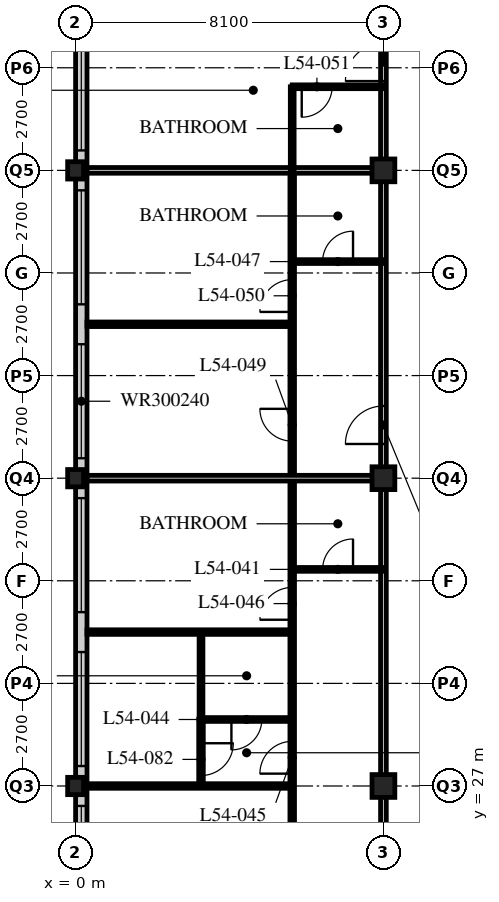
"""IFC4 building model, lengths in metres.
Left out: names, types, materials, properties, quantities, classifications, styles, units other than length and angle.
Written with IfcOpenShell. Run it as: python <this file> out.ifc"""

import sys

from ifc_helpers import new_model, si_unit, direction, frame, frame_2d, origin, origin_2d, place, context, subcontext, project, spatial, rectangle, hollow_rectangle, i_section, extrude, element, fill, save


model = new_model("IFC4")
c1 = context("Model", 3, precision=1e-05, world=origin(), true_north=direction((0.0, 1.0)))
c2 = subcontext(c1, "Body", "Model", "MODEL_VIEW")
j1 = project(units=[si_unit("LENGTHUNIT", "METRE"), si_unit("PLANEANGLEUNIT", "RADIAN")], contexts=[c1])
p1 = place(None, origin())
s1 = spatial("IfcSite", under=j1, at=p1, CompositionType="ELEMENT")
p2 = place(p1, origin())
s2 = spatial("IfcBuilding", under=s1, at=p2, CompositionType="ELEMENT")
p3 = place(p2, frame((0.0, 0.0, 210.0)))
s3 = spatial("IfcBuildingStorey", under=s2, at=p3, CompositionType="ELEMENT", Elevation=210.0)
for number, where, z_axis, x_axis in (
    (1, (0.0, 27.0, 0.0), (0.0, 0.0, 1.0), (1.0, 0.0, 0.0)),
    (2, (0.0, 35.1, 0.0), (0.0, 0.0, 1.0), (1.0, 0.0, 0.0)),
    (3, (0.0, 43.2, 0.0), (0.0, 0.0, 1.0), (1.0, 0.0, 0.0)),
):
    element("IfcColumn", number, at=place(p3, frame(where, z_axis=z_axis, x_axis=x_axis)), inside=s3, PredefinedType="COLUMN", context=c2, shape_type="SweptSolid", body=[
        extrude(i_section(OverallWidth=0.418, OverallDepth=0.456, WebThickness=0.042, FlangeThickness=0.067, FilletRadius=0.015, at=origin_2d()), origin(), (0.0, 0.0, 1.0), 3.6),
    ])
for number, where, z_axis, x_axis in (
    (4, (8.1, 27.0, 0.0), (0.0, 0.0, 1.0), (1.0, 0.0, 0.0)),
    (5, (8.1, 35.1, 0.0), (0.0, 0.0, 1.0), (1.0, 0.0, 0.0)),
    (6, (8.1, 43.2, 0.0), (0.0, 0.0, 1.0), (1.0, 0.0, 0.0)),
):
    element("IfcColumn", number, at=place(p3, frame(where, z_axis=z_axis, x_axis=x_axis)), inside=s3, PredefinedType="COLUMN", context=c2, shape_type="SweptSolid", body=[
        extrude(hollow_rectangle(XDim=0.6, YDim=0.6, WallThickness=0.05, at=origin_2d()), origin(), (0.0, 0.0, 1.0), 3.6),
    ])
p4 = place(p3, frame((0.15, 51.0, 0.0), z_axis=(0.0, 0.0, 1.0), x_axis=(0.0, -1.0, 0.0)))
e7 = element("IfcWall", 7, at=p4, inside=s3, PredefinedType="SOLIDWALL", context=c2, shape_type="SweptSolid", body=[
    extrude(rectangle(XDim=32.1, YDim=0.3, at=frame_2d((16.05, 0.0))), origin(), (0.0, 0.0, 1.0), 3.39),
])
p5 = place(p4, frame((0.225, 0.0, 0.6)))
e8 = element("IfcOpeningElement", 8, at=p5, cuts=e7, PredefinedType="OPENING", context=c2, shape_type="SweptSolid", body=[
    extrude(rectangle(XDim=3.0, YDim=2.4, at=frame_2d((1.5, 1.2))), frame((0.0, 0.16, 0.0), z_axis=(0.0, -1.0, 0.0), x_axis=(1.0, 0.0, 0.0)), (0.0, 0.0, 1.0), 0.32),
])
p6 = place(p4, frame((4.275, 0.0, 0.6)))
e9 = element("IfcOpeningElement", 9, at=p6, cuts=e7, PredefinedType="OPENING", context=c2, shape_type="SweptSolid", body=[
    extrude(rectangle(XDim=3.0, YDim=2.4, at=frame_2d((1.5, 1.2))), frame((0.0, 0.16, 0.0), z_axis=(0.0, -1.0, 0.0), x_axis=(1.0, 0.0, 0.0)), (0.0, 0.0, 1.0), 0.32),
])
p7 = place(p4, frame((8.325, 0.0, 0.6)))
e10 = element("IfcOpeningElement", 10, at=p7, cuts=e7, PredefinedType="OPENING", context=c2, shape_type="SweptSolid", body=[
    extrude(rectangle(XDim=3.0, YDim=2.4, at=frame_2d((1.5, 1.2))), frame((0.0, 0.16, 0.0), z_axis=(0.0, -1.0, 0.0), x_axis=(1.0, 0.0, 0.0)), (0.0, 0.0, 1.0), 0.32),
])
p8 = place(p4, frame((12.375, 0.0, 0.6)))
e11 = element("IfcOpeningElement", 11, at=p8, cuts=e7, PredefinedType="OPENING", context=c2, shape_type="SweptSolid", body=[
    extrude(rectangle(XDim=3.0, YDim=2.4, at=frame_2d((1.5, 1.2))), frame((0.0, 0.16, 0.0), z_axis=(0.0, -1.0, 0.0), x_axis=(1.0, 0.0, 0.0)), (0.0, 0.0, 1.0), 0.32),
])
p9 = place(p4, frame((16.425, 0.0, 0.6)))
e12 = element("IfcOpeningElement", 12, at=p9, cuts=e7, PredefinedType="OPENING", context=c2, shape_type="SweptSolid", body=[
    extrude(rectangle(XDim=3.0, YDim=2.4, at=frame_2d((1.5, 1.2))), frame((0.0, 0.16, 0.0), z_axis=(0.0, -1.0, 0.0), x_axis=(1.0, 0.0, 0.0)), (0.0, 0.0, 1.0), 0.32),
])
p10 = place(p4, frame((20.475, 0.0, 0.6)))
e13 = element("IfcOpeningElement", 13, at=p10, cuts=e7, PredefinedType="OPENING", context=c2, shape_type="SweptSolid", body=[
    extrude(rectangle(XDim=3.0, YDim=2.4, at=frame_2d((1.5, 1.2))), frame((0.0, 0.16, 0.0), z_axis=(0.0, -1.0, 0.0), x_axis=(1.0, 0.0, 0.0)), (0.0, 0.0, 1.0), 0.32),
])
p11 = place(p4, frame((24.525, 0.0, 0.6)))
e14 = element("IfcOpeningElement", 14, at=p11, cuts=e7, PredefinedType="OPENING", context=c2, shape_type="SweptSolid", body=[
    extrude(rectangle(XDim=3.0, YDim=2.4, at=frame_2d((1.5, 1.2))), frame((0.0, 0.16, 0.0), z_axis=(0.0, -1.0, 0.0), x_axis=(1.0, 0.0, 0.0)), (0.0, 0.0, 1.0), 0.32),
])
p12 = place(p4, frame((28.575, 0.0, 0.6)))
e15 = element("IfcOpeningElement", 15, at=p12, cuts=e7, PredefinedType="OPENING", context=c2, shape_type="SweptSolid", body=[
    extrude(rectangle(XDim=3.0, YDim=2.4, at=frame_2d((1.5, 1.2))), frame((0.0, 0.16, 0.0), z_axis=(0.0, -1.0, 0.0), x_axis=(1.0, 0.0, 0.0)), (0.0, 0.0, 1.0), 0.32),
])
p13 = place(p3, frame((8.1, 18.9, 0.0), z_axis=(0.0, 0.0, 1.0), x_axis=(0.0, 1.0, 0.0)))
e16 = element("IfcWall", 16, at=p13, inside=s3, PredefinedType="PARTITIONING", context=c2, shape_type="SweptSolid", body=[
    extrude(rectangle(XDim=28.35, YDim=0.15, at=frame_2d((14.175, 0.0))), origin(), (0.0, 0.0, 1.0), 2.778),
])
p14 = place(p13, frame((0.9, 0.0, 0.0)))
e17 = element("IfcOpeningElement", 17, at=p14, cuts=e16, PredefinedType="OPENING", context=c2, shape_type="SweptSolid", body=[
    extrude(rectangle(XDim=1.0, YDim=2.1, at=frame_2d((0.5, 1.05))), frame((0.0, 0.085, 0.0), z_axis=(0.0, -1.0, 0.0), x_axis=(1.0, 0.0, 0.0)), (0.0, 0.0, 1.0), 0.17),
])
p15 = place(p13, frame((17.1, 0.0, 0.0)))
e18 = element("IfcOpeningElement", 18, at=p15, cuts=e16, PredefinedType="OPENING", context=c2, shape_type="SweptSolid", body=[
    extrude(rectangle(XDim=1.0, YDim=2.1, at=frame_2d((0.5, 1.05))), frame((0.0, 0.085, 0.0), z_axis=(0.0, -1.0, 0.0), x_axis=(1.0, 0.0, 0.0)), (0.0, 0.0, 1.0), 0.17),
])
p16 = place(p13, frame((26.65, 0.0, 0.0)))
e19 = element("IfcOpeningElement", 19, at=p16, cuts=e16, PredefinedType="OPENING", context=c2, shape_type="SweptSolid", body=[
    extrude(rectangle(XDim=1.0, YDim=2.1, at=frame_2d((0.5, 1.05))), frame((0.0, 0.085, 0.0), z_axis=(0.0, -1.0, 0.0), x_axis=(1.0, 0.0, 0.0)), (0.0, 0.0, 1.0), 0.17),
])
p17 = place(p3, frame((5.7, 18.9, 0.0), z_axis=(0.0, 0.0, 1.0), x_axis=(0.0, 1.0, 0.0)))
e20 = element("IfcWall", 20, at=p17, inside=s3, PredefinedType="PARTITIONING", context=c2, shape_type="SweptSolid", body=[
    extrude(rectangle(XDim=24.3, YDim=0.12, at=frame_2d((12.15, 0.0))), origin(), (0.0, 0.0, 1.0), 3.39),
])
p18 = place(p17, frame((0.975, 0.0, 0.0)))
e21 = element("IfcOpeningElement", 21, at=p18, cuts=e20, PredefinedType="OPENING", context=c2, shape_type="SweptSolid", body=[
    extrude(rectangle(XDim=0.85, YDim=2.1, at=frame_2d((0.425, 1.05))), frame((0.0, 0.07, 0.0), z_axis=(0.0, -1.0, 0.0), x_axis=(1.0, 0.0, 0.0)), (0.0, 0.0, 1.0), 0.14),
])
p19 = place(p17, frame((8.425, 0.0, 0.0)))
e22 = element("IfcOpeningElement", 22, at=p19, cuts=e20, PredefinedType="OPENING", context=c2, shape_type="SweptSolid", body=[
    extrude(rectangle(XDim=0.85, YDim=2.1, at=frame_2d((0.425, 1.05))), frame((0.0, 0.07, 0.0), z_axis=(0.0, -1.0, 0.0), x_axis=(1.0, 0.0, 0.0)), (0.0, 0.0, 1.0), 0.14),
])
p20 = place(p17, frame((12.475, 0.0, 0.0)))
e23 = element("IfcOpeningElement", 23, at=p20, cuts=e20, PredefinedType="OPENING", context=c2, shape_type="SweptSolid", body=[
    extrude(rectangle(XDim=0.85, YDim=2.1, at=frame_2d((0.425, 1.05))), frame((0.0, 0.07, 0.0), z_axis=(0.0, -1.0, 0.0), x_axis=(1.0, 0.0, 0.0)), (0.0, 0.0, 1.0), 0.14),
])
p21 = place(p17, frame((17.175, 0.0, 0.0)))
e24 = element("IfcOpeningElement", 24, at=p21, cuts=e20, PredefinedType="OPENING", context=c2, shape_type="SweptSolid", body=[
    extrude(rectangle(XDim=0.85, YDim=2.1, at=frame_2d((0.425, 1.05))), frame((0.0, 0.07, 0.0), z_axis=(0.0, -1.0, 0.0), x_axis=(1.0, 0.0, 0.0)), (0.0, 0.0, 1.0), 0.14),
])
p22 = place(p17, frame((20.575, 0.0, 0.0)))
e25 = element("IfcOpeningElement", 25, at=p22, cuts=e20, PredefinedType="OPENING", context=c2, shape_type="SweptSolid", body=[
    extrude(rectangle(XDim=0.85, YDim=2.1, at=frame_2d((0.425, 1.05))), frame((0.0, 0.07, 0.0), z_axis=(0.0, -1.0, 0.0), x_axis=(1.0, 0.0, 0.0)), (0.0, 0.0, 1.0), 0.14),
])
p23 = place(p3, frame((8.1, 32.7, 0.0), z_axis=(0.0, 0.0, 1.0), x_axis=(-1.0, 0.0, 0.0)))
e26 = element("IfcWall", 26, at=p23, inside=s3, PredefinedType="PARTITIONING", context=c2, shape_type="SweptSolid", body=[
    extrude(rectangle(XDim=2.4, YDim=0.1, at=frame_2d((1.2, 0.0))), origin(), (0.0, 0.0, 1.0), 3.39),
])
p24 = place(p23, frame((0.8, 0.0, 0.0)))
e27 = element("IfcOpeningElement", 27, at=p24, cuts=e26, PredefinedType="OPENING", context=c2, shape_type="SweptSolid", body=[
    extrude(rectangle(XDim=0.8, YDim=2.1, at=frame_2d((0.4, 1.05))), frame((0.0, 0.06, 0.0), z_axis=(0.0, -1.0, 0.0), x_axis=(1.0, 0.0, 0.0)), (0.0, 0.0, 1.0), 0.12),
])
p25 = place(p3, frame((5.7, 28.75, 0.0), z_axis=(0.0, 0.0, 1.0), x_axis=(-1.0, 0.0, 0.0)))
e28 = element("IfcWall", 28, at=p25, inside=s3, PredefinedType="PARTITIONING", context=c2, shape_type="SweptSolid", body=[
    extrude(rectangle(XDim=2.4, YDim=0.1, at=frame_2d((1.2, 0.0))), origin(), (0.0, 0.0, 1.0), 3.39),
])
p26 = place(p25, frame((0.8, 0.0, 0.0)))
e29 = element("IfcOpeningElement", 29, at=p26, cuts=e28, PredefinedType="OPENING", context=c2, shape_type="SweptSolid", body=[
    extrude(rectangle(XDim=0.8, YDim=2.1, at=frame_2d((0.4, 1.05))), frame((0.0, 0.06, 0.0), z_axis=(0.0, -1.0, 0.0), x_axis=(1.0, 0.0, 0.0)), (0.0, 0.0, 1.0), 0.12),
])
p27 = place(p3, frame((3.3, 28.75, 0.0), z_axis=(0.0, 0.0, 1.0), x_axis=(0.0, 1.0, 0.0)))
e30 = element("IfcWall", 30, at=p27, inside=s3, PredefinedType="PARTITIONING", context=c2, shape_type="SweptSolid", body=[
    extrude(rectangle(XDim=2.3, YDim=0.1, at=frame_2d((1.15, 0.0))), origin(), (0.0, 0.0, 1.0), 3.39),
])
p28 = place(p3, frame((5.7, 27.0, 0.0), z_axis=(0.0, 0.0, 1.0), x_axis=(-1.0, 0.0, 0.0)))
e31 = element("IfcWall", 31, at=p28, inside=s3, PredefinedType="PARTITIONING", context=c2, shape_type="SweptSolid", body=[
    extrude(rectangle(XDim=5.4, YDim=0.12, at=frame_2d((2.7, 0.0))), origin(), (0.0, 0.0, 1.0), 2.778),
])
p29 = place(p3, frame((5.7, 31.05, 0.0), z_axis=(0.0, 0.0, 1.0), x_axis=(-1.0, 0.0, 0.0)))
e32 = element("IfcWall", 32, at=p29, inside=s3, PredefinedType="PARTITIONING", context=c2, shape_type="SweptSolid", body=[
    extrude(rectangle(XDim=5.4, YDim=0.12, at=frame_2d((2.7, 0.0))), origin(), (0.0, 0.0, 1.0), 3.39),
])
p30 = place(p3, frame((8.1, 35.1, 0.0), z_axis=(0.0, 0.0, 1.0), x_axis=(-1.0, 0.0, 0.0)))
e33 = element("IfcWall", 33, at=p30, inside=s3, PredefinedType="PARTITIONING", context=c2, shape_type="SweptSolid", body=[
    extrude(rectangle(XDim=7.8, YDim=0.15, at=frame_2d((3.9, 0.0))), origin(), (0.0, 0.0, 1.0), 2.778),
])
p31 = place(p3, frame((8.1, 40.8, 0.0), z_axis=(0.0, 0.0, 1.0), x_axis=(-1.0, 0.0, 0.0)))
e34 = element("IfcWall", 34, at=p31, inside=s3, PredefinedType="PARTITIONING", context=c2, shape_type="SweptSolid", body=[
    extrude(rectangle(XDim=2.4, YDim=0.1, at=frame_2d((1.2, 0.0))), origin(), (0.0, 0.0, 1.0), 3.39),
])
p32 = place(p31, frame((0.8, 0.0, 0.0)))
e35 = element("IfcOpeningElement", 35, at=p32, cuts=e34, PredefinedType="OPENING", context=c2, shape_type="SweptSolid", body=[
    extrude(rectangle(XDim=0.8, YDim=2.1, at=frame_2d((0.4, 1.05))), frame((0.0, 0.06, 0.0), z_axis=(0.0, -1.0, 0.0), x_axis=(1.0, 0.0, 0.0)), (0.0, 0.0, 1.0), 0.12),
])
p33 = place(p3, frame((5.7, 39.15, 0.0), z_axis=(0.0, 0.0, 1.0), x_axis=(-1.0, 0.0, 0.0)))
e36 = element("IfcWall", 36, at=p33, inside=s3, PredefinedType="PARTITIONING", context=c2, shape_type="SweptSolid", body=[
    extrude(rectangle(XDim=5.4, YDim=0.12, at=frame_2d((2.7, 0.0))), origin(), (0.0, 0.0, 1.0), 3.39),
])
p34 = place(p3, frame((8.1, 43.2, 0.0), z_axis=(0.0, 0.0, 1.0), x_axis=(-1.0, 0.0, 0.0)))
e37 = element("IfcWall", 37, at=p34, inside=s3, PredefinedType="PARTITIONING", context=c2, shape_type="SweptSolid", body=[
    extrude(rectangle(XDim=7.8, YDim=0.15, at=frame_2d((3.9, 0.0))), origin(), (0.0, 0.0, 1.0), 2.778),
])
p35 = place(p3, frame((5.7, 43.2, 0.0), z_axis=(0.0, 0.0, 1.0), x_axis=(0.0, 1.0, 0.0)))
e38 = element("IfcWall", 38, at=p35, inside=s3, PredefinedType="PARTITIONING", context=c2, shape_type="SweptSolid", body=[
    extrude(rectangle(XDim=2.2, YDim=0.1, at=frame_2d((1.1, 0.0))), origin(), (0.0, 0.0, 1.0), 3.39),
])
p36 = place(p3, frame((8.1, 45.4, 0.0), z_axis=(0.0, 0.0, 1.0), x_axis=(-1.0, 0.0, 0.0)))
e39 = element("IfcWall", 39, at=p36, inside=s3, PredefinedType="PARTITIONING", context=c2, shape_type="SweptSolid", body=[
    extrude(rectangle(XDim=2.4, YDim=0.1, at=frame_2d((1.2, 0.0))), origin(), (0.0, 0.0, 1.0), 3.39),
])
p37 = place(p36, frame((1.35, 0.0, 0.0)))
e40 = element("IfcOpeningElement", 40, at=p37, cuts=e39, PredefinedType="OPENING", context=c2, shape_type="SweptSolid", body=[
    extrude(rectangle(XDim=0.8, YDim=2.1, at=frame_2d((0.4, 1.05))), frame((0.0, 0.06, 0.0), z_axis=(0.0, -1.0, 0.0), x_axis=(1.0, 0.0, 0.0)), (0.0, 0.0, 1.0), 0.12),
])
p38 = place(p3, frame((3.3, 27.0, 0.0), z_axis=(0.0, 0.0, 1.0), x_axis=(0.0, 1.0, 0.0)))
e41 = element("IfcWall", 41, at=p38, inside=s3, PredefinedType="PARTITIONING", context=c2, shape_type="SweptSolid", body=[
    extrude(rectangle(XDim=1.76, YDim=0.12, at=frame_2d((0.88, 0.0))), origin(), (0.0, 0.0, 1.0), 3.39),
])
p39 = place(p38, frame((0.275, 0.0, 0.0)))
e42 = element("IfcOpeningElement", 42, at=p39, cuts=e41, PredefinedType="OPENING", context=c2, shape_type="SweptSolid", body=[
    extrude(rectangle(XDim=0.85, YDim=2.1, at=frame_2d((0.425, 1.05))), frame((0.0, 0.07, 0.0), z_axis=(0.0, -1.0, 0.0), x_axis=(1.0, 0.0, 0.0)), (0.0, 0.0, 1.0), 0.14),
])
p40 = place(p6, origin())
e43 = element("IfcWindow", 43, at=p40, inside=s3, PartitioningType="SINGLE_PANEL", PredefinedType="WINDOW", context=c2, shape_type="SweptSolid", body=[
    extrude(rectangle(XDim=3.0, YDim=2.4, at=frame_2d((1.5, 1.2))), frame((0.0, 0.03, 0.0), z_axis=(0.0, -1.0, 0.0), x_axis=(1.0, 0.0, 0.0)), (0.0, 0.0, 1.0), 0.06),
])
fill(e9, e43)
p41 = place(p7, origin())
e44 = element("IfcWindow", 44, at=p41, inside=s3, PartitioningType="SINGLE_PANEL", PredefinedType="WINDOW", context=c2, shape_type="SweptSolid", body=[
    extrude(rectangle(XDim=3.0, YDim=2.4, at=frame_2d((1.5, 1.2))), frame((0.0, 0.03, 0.0), z_axis=(0.0, -1.0, 0.0), x_axis=(1.0, 0.0, 0.0)), (0.0, 0.0, 1.0), 0.06),
])
fill(e10, e44)
p42 = place(p8, origin())
e45 = element("IfcWindow", 45, at=p42, inside=s3, PartitioningType="SINGLE_PANEL", PredefinedType="WINDOW", context=c2, shape_type="SweptSolid", body=[
    extrude(rectangle(XDim=3.0, YDim=2.4, at=frame_2d((1.5, 1.2))), frame((0.0, 0.03, 0.0), z_axis=(0.0, -1.0, 0.0), x_axis=(1.0, 0.0, 0.0)), (0.0, 0.0, 1.0), 0.06),
])
fill(e11, e45)
p43 = place(p9, origin())
e46 = element("IfcWindow", 46, at=p43, inside=s3, PartitioningType="SINGLE_PANEL", PredefinedType="WINDOW", context=c2, shape_type="SweptSolid", body=[
    extrude(rectangle(XDim=3.0, YDim=2.4, at=frame_2d((1.5, 1.2))), frame((0.0, 0.03, 0.0), z_axis=(0.0, -1.0, 0.0), x_axis=(1.0, 0.0, 0.0)), (0.0, 0.0, 1.0), 0.06),
])
fill(e12, e46)
p44 = place(p10, origin())
e47 = element("IfcWindow", 47, at=p44, inside=s3, PartitioningType="SINGLE_PANEL", PredefinedType="WINDOW", context=c2, shape_type="SweptSolid", body=[
    extrude(rectangle(XDim=3.0, YDim=2.4, at=frame_2d((1.5, 1.2))), frame((0.0, 0.03, 0.0), z_axis=(0.0, -1.0, 0.0), x_axis=(1.0, 0.0, 0.0)), (0.0, 0.0, 1.0), 0.06),
])
fill(e13, e47)
p45 = place(p11, origin())
e48 = element("IfcWindow", 48, at=p45, inside=s3, PartitioningType="SINGLE_PANEL", PredefinedType="WINDOW", context=c2, shape_type="SweptSolid", body=[
    extrude(rectangle(XDim=3.0, YDim=2.4, at=frame_2d((1.5, 1.2))), frame((0.0, 0.03, 0.0), z_axis=(0.0, -1.0, 0.0), x_axis=(1.0, 0.0, 0.0)), (0.0, 0.0, 1.0), 0.06),
])
fill(e14, e48)
p46 = place(p24, origin())
e49 = element("IfcDoor", 49, at=p46, inside=s3, OperationType="SINGLE_SWING_RIGHT", PredefinedType="DOOR", context=c2, shape_type="SweptSolid", body=[
    extrude(rectangle(XDim=0.8, YDim=2.1, at=frame_2d((0.4, 1.05))), frame((0.0, 0.025, 0.0), z_axis=(0.0, -1.0, 0.0), x_axis=(1.0, 0.0, 0.0)), (0.0, 0.0, 1.0), 0.05),
])
fill(e27, e49)
p47 = place(p26, origin())
e50 = element("IfcDoor", 50, at=p47, inside=s3, OperationType="SINGLE_SWING_RIGHT", PredefinedType="DOOR", context=c2, shape_type="SweptSolid", body=[
    extrude(rectangle(XDim=0.8, YDim=2.1, at=frame_2d((0.4, 1.05))), frame((0.0, 0.025, 0.0), z_axis=(0.0, -1.0, 0.0), x_axis=(1.0, 0.0, 0.0)), (0.0, 0.0, 1.0), 0.05),
])
fill(e29, e50)
p48 = place(p19, origin())
e51 = element("IfcDoor", 51, at=p48, inside=s3, OperationType="SINGLE_SWING_LEFT", PredefinedType="DOOR", context=c2, shape_type="SweptSolid", body=[
    extrude(rectangle(XDim=0.85, YDim=2.1, at=frame_2d((0.425, 1.05))), frame((0.0, 0.025, 0.0), z_axis=(0.0, -1.0, 0.0), x_axis=(1.0, 0.0, 0.0)), (0.0, 0.0, 1.0), 0.05),
])
fill(e22, e51)
p49 = place(p20, origin())
e52 = element("IfcDoor", 52, at=p49, inside=s3, OperationType="SINGLE_SWING_LEFT", PredefinedType="DOOR", context=c2, shape_type="SweptSolid", body=[
    extrude(rectangle(XDim=0.85, YDim=2.1, at=frame_2d((0.425, 1.05))), frame((0.0, 0.025, 0.0), z_axis=(0.0, -1.0, 0.0), x_axis=(1.0, 0.0, 0.0)), (0.0, 0.0, 1.0), 0.05),
])
fill(e23, e52)
p50 = place(p32, origin())
e53 = element("IfcDoor", 53, at=p50, inside=s3, OperationType="SINGLE_SWING_RIGHT", PredefinedType="DOOR", context=c2, shape_type="SweptSolid", body=[
    extrude(rectangle(XDim=0.8, YDim=2.1, at=frame_2d((0.4, 1.05))), frame((0.0, 0.025, 0.0), z_axis=(0.0, -1.0, 0.0), x_axis=(1.0, 0.0, 0.0)), (0.0, 0.0, 1.0), 0.05),
])
fill(e35, e53)
p51 = place(p15, origin())
e54 = element("IfcDoor", 54, at=p51, inside=s3, OperationType="SINGLE_SWING_LEFT", PredefinedType="DOOR", context=c2, shape_type="SweptSolid", body=[
    extrude(rectangle(XDim=1.0, YDim=2.1, at=frame_2d((0.5, 1.05))), frame((0.0, 0.025, 0.0), z_axis=(0.0, -1.0, 0.0), x_axis=(1.0, 0.0, 0.0)), (0.0, 0.0, 1.0), 0.05),
])
fill(e18, e54)
p52 = place(p21, origin())
e55 = element("IfcDoor", 55, at=p52, inside=s3, OperationType="SINGLE_SWING_RIGHT", PredefinedType="DOOR", context=c2, shape_type="SweptSolid", body=[
    extrude(rectangle(XDim=0.85, YDim=2.1, at=frame_2d((0.425, 1.05))), frame((0.0, 0.025, 0.0), z_axis=(0.0, -1.0, 0.0), x_axis=(1.0, 0.0, 0.0)), (0.0, 0.0, 1.0), 0.05),
])
fill(e24, e55)
p53 = place(p22, origin())
e56 = element("IfcDoor", 56, at=p53, inside=s3, OperationType="SINGLE_SWING_LEFT", PredefinedType="DOOR", context=c2, shape_type="SweptSolid", body=[
    extrude(rectangle(XDim=0.85, YDim=2.1, at=frame_2d((0.425, 1.05))), frame((0.0, 0.025, 0.0), z_axis=(0.0, -1.0, 0.0), x_axis=(1.0, 0.0, 0.0)), (0.0, 0.0, 1.0), 0.05),
])
fill(e25, e56)
p54 = place(p37, origin())
e57 = element("IfcDoor", 57, at=p54, inside=s3, OperationType="SINGLE_SWING_RIGHT", PredefinedType="DOOR", context=c2, shape_type="SweptSolid", body=[
    extrude(rectangle(XDim=0.8, YDim=2.1, at=frame_2d((0.4, 1.05))), frame((0.0, 0.025, 0.0), z_axis=(0.0, -1.0, 0.0), x_axis=(1.0, 0.0, 0.0)), (0.0, 0.0, 1.0), 0.05),
])
fill(e40, e57)
p55 = place(p16, origin())
e58 = element("IfcDoor", 58, at=p55, inside=s3, OperationType="SINGLE_SWING_LEFT", PredefinedType="DOOR", context=c2, shape_type="SweptSolid", body=[
    extrude(rectangle(XDim=1.0, YDim=2.1, at=frame_2d((0.5, 1.05))), frame((0.0, 0.025, 0.0), z_axis=(0.0, -1.0, 0.0), x_axis=(1.0, 0.0, 0.0)), (0.0, 0.0, 1.0), 0.05),
])
fill(e19, e58)
p56 = place(p39, origin())
e59 = element("IfcDoor", 59, at=p56, inside=s3, OperationType="SINGLE_SWING_LEFT", PredefinedType="DOOR", context=c2, shape_type="SweptSolid", body=[
    extrude(rectangle(XDim=0.85, YDim=2.1, at=frame_2d((0.425, 1.05))), frame((0.0, 0.025, 0.0), z_axis=(0.0, -1.0, 0.0), x_axis=(1.0, 0.0, 0.0)), (0.0, 0.0, 1.0), 0.05),
])
fill(e42, e59)
save(model, sys.argv[1])
